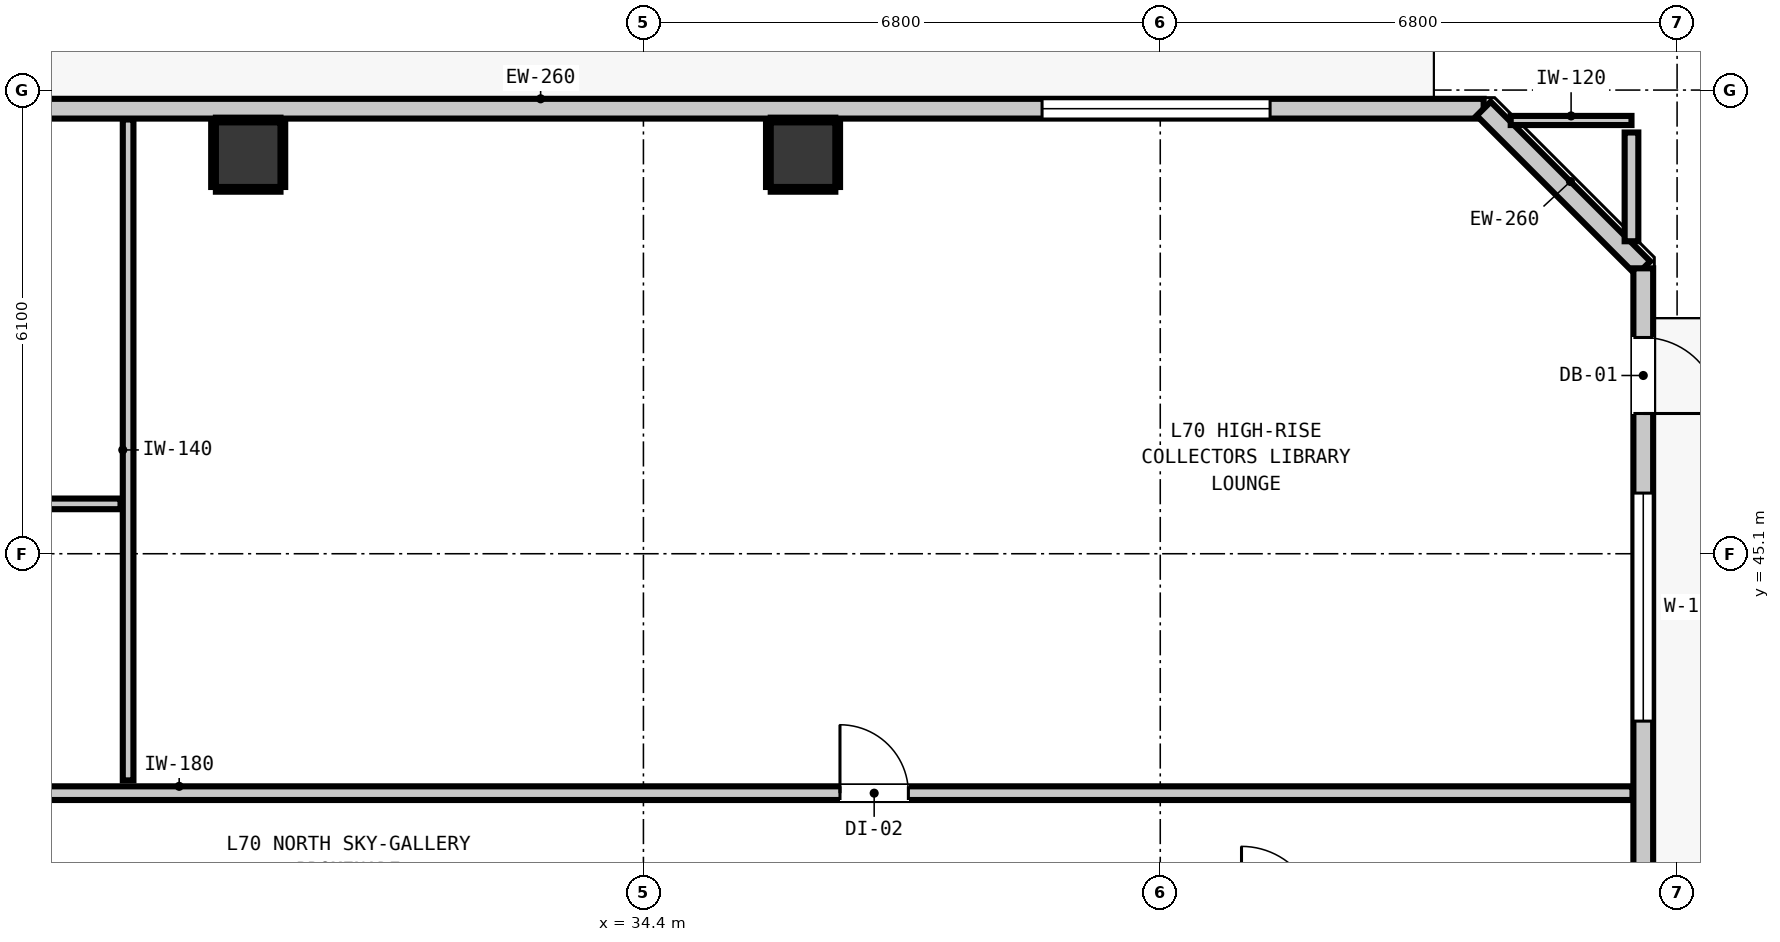
"""IFC4 building model, lengths in metres.
Left out: names, types, materials, properties, quantities, classifications, styles, units other than length and angle.
Written with IfcOpenShell. Run it as: python <this file> out.ifc"""

import sys

from ifc_helpers import new_model, si_unit, direction, frame, frame_2d, origin, origin_2d, place, context, subcontext, project, spatial, rectangle, extrude, element, fill, save


model = new_model("IFC4")
c1 = context("Model", 3, precision=1e-05, world=origin(), true_north=direction((0.0, 1.0)))
c2 = subcontext(c1, "Body", "Model", "MODEL_VIEW")
j1 = project(units=[si_unit("LENGTHUNIT", "METRE"), si_unit("PLANEANGLEUNIT", "RADIAN")], contexts=[c1])
p1 = place(None, origin())
s1 = spatial("IfcSite", under=j1, at=p1, CompositionType="ELEMENT")
p2 = place(p1, origin())
s2 = spatial("IfcBuilding", under=s1, at=p2, CompositionType="ELEMENT")
p3 = place(p2, frame((0.0, 0.0, 241.24)))
s3 = spatial("IfcBuildingStorey", under=s2, at=p3, CompositionType="ELEMENT", Elevation=241.24)
for number, where, z_axis, x_axis in (
    (1, (29.2, 50.35, 0.0), (0.0, 0.0, 1.0), (1.0, 0.0, 0.0)),
    (2, (36.5, 50.35, 0.0), (0.0, 0.0, 1.0), (1.0, 0.0, 0.0)),
):
    element("IfcColumn", number, at=place(p3, frame(where, z_axis=z_axis, x_axis=x_axis)), inside=s3, PredefinedType="COLUMN", context=c2, shape_type="SweptSolid", body=[
        extrude(rectangle(XDim=0.85, YDim=0.85, at=origin_2d()), origin(), (0.0, 0.0, 1.0), 3.32),
    ])
p4 = place(p3, frame((12.745, 50.955, 0.0), z_axis=(0.0, 0.0, 1.0), x_axis=(1.0, 0.0, 0.0)))
e3 = element("IfcWall", 3, at=p4, inside=s3, PredefinedType="STANDARD", context=c2, shape_type="SweptSolid", body=[
    extrude(rectangle(XDim=32.71, YDim=0.26, at=frame_2d((16.355, 0.0))), origin(), (0.0, 0.0, 1.0), 3.1),
])
p5 = place(p4, frame((1.61, 0.0, 0.0)))
e4 = element("IfcOpeningElement", 4, at=p5, cuts=e3, PredefinedType="OPENING", context=c2, shape_type="SweptSolid", body=[
    extrude(rectangle(XDim=1.0, YDim=2.15, at=frame_2d((0.5, 1.075))), frame((0.0, 0.14, 0.0), z_axis=(0.0, -1.0, 0.0), x_axis=(1.0, 0.0, 0.0)), (0.0, 0.0, 1.0), 0.28),
])
p6 = place(p4, frame((3.901, 0.0, 0.85)))
e5 = element("IfcOpeningElement", 5, at=p6, cuts=e3, PredefinedType="OPENING", context=c2, shape_type="SweptSolid", body=[
    extrude(rectangle(XDim=3.0, YDim=2.1, at=frame_2d((1.5, 1.05))), frame((0.0, 0.14, 0.0), z_axis=(0.0, -1.0, 0.0), x_axis=(1.0, 0.0, 0.0)), (0.0, 0.0, 1.0), 0.28),
])
p7 = place(p4, frame((10.705, 0.0, 0.85)))
e6 = element("IfcOpeningElement", 6, at=p7, cuts=e3, PredefinedType="OPENING", context=c2, shape_type="SweptSolid", body=[
    extrude(rectangle(XDim=3.0, YDim=2.1, at=frame_2d((1.5, 1.05))), frame((0.0, 0.14, 0.0), z_axis=(0.0, -1.0, 0.0), x_axis=(1.0, 0.0, 0.0)), (0.0, 0.0, 1.0), 0.28),
])
p8 = place(p4, frame((26.9, 0.0, 0.85)))
e7 = element("IfcOpeningElement", 7, at=p8, cuts=e3, PredefinedType="OPENING", context=c2, shape_type="SweptSolid", body=[
    extrude(rectangle(XDim=3.0, YDim=2.1, at=frame_2d((1.5, 1.05))), frame((0.0, 0.14, 0.0), z_axis=(0.0, -1.0, 0.0), x_axis=(1.0, 0.0, 0.0)), (0.0, 0.0, 1.0), 0.28),
])
p9 = place(p3, frame((45.455, 50.955, 0.0), z_axis=(0.0, 0.0, 1.0), x_axis=(0.707065676302, -0.707147883682, 0.0)))
e8 = element("IfcWall", 8, at=p9, inside=s3, PredefinedType="STANDARD", context=c2, shape_type="SweptSolid", body=[
    extrude(rectangle(XDim=2.97, YDim=0.26, at=frame_2d((1.485, 0.0))), origin(), (0.0, 0.0, 1.0), 3.1),
])
p10 = place(p3, frame((47.555, 48.855, 0.0), z_axis=(0.0, 0.0, 1.0), x_axis=(0.0, -1.0, 0.0)))
e9 = element("IfcWall", 9, at=p10, inside=s3, PredefinedType="STANDARD", context=c2, shape_type="SweptSolid", body=[
    extrude(rectangle(XDim=30.31, YDim=0.26, at=frame_2d((15.155, 0.0))), origin(), (0.0, 0.0, 1.0), 3.1),
])
p11 = place(p10, frame((0.91, 0.0, 0.0)))
e10 = element("IfcOpeningElement", 10, at=p11, cuts=e9, PredefinedType="OPENING", context=c2, shape_type="SweptSolid", body=[
    extrude(rectangle(XDim=1.0, YDim=2.15, at=frame_2d((0.5, 1.075))), frame((0.0, 0.14, 0.0), z_axis=(0.0, -1.0, 0.0), x_axis=(1.0, 0.0, 0.0)), (0.0, 0.0, 1.0), 0.28),
])
p12 = place(p10, frame((2.957, 0.0, 0.85)))
e11 = element("IfcOpeningElement", 11, at=p12, cuts=e9, PredefinedType="OPENING", context=c2, shape_type="SweptSolid", body=[
    extrude(rectangle(XDim=3.0, YDim=2.1, at=frame_2d((1.5, 1.05))), frame((0.0, 0.14, 0.0), z_axis=(0.0, -1.0, 0.0), x_axis=(1.0, 0.0, 0.0)), (0.0, 0.0, 1.0), 0.28),
])
p13 = place(p10, frame((21.005, 0.0, 0.85)))
e12 = element("IfcOpeningElement", 12, at=p13, cuts=e9, PredefinedType="OPENING", context=c2, shape_type="SweptSolid", body=[
    extrude(rectangle(XDim=3.0, YDim=2.1, at=frame_2d((1.5, 1.05))), frame((0.0, 0.14, 0.0), z_axis=(0.0, -1.0, 0.0), x_axis=(1.0, 0.0, 0.0)), (0.0, 0.0, 1.0), 0.28),
])
p14 = place(p3, frame((10.787, 41.95, 0.0), z_axis=(0.0, 0.0, 1.0), x_axis=(1.0, 0.0, 0.0)))
e13 = element("IfcWall", 13, at=p14, inside=s3, PredefinedType="PARTITIONING", context=c2, shape_type="SweptSolid", body=[
    extrude(rectangle(XDim=36.626, YDim=0.18, at=frame_2d((18.313, 0.0))), origin(), (0.0, 0.0, 1.0), 3.1),
])
p15 = place(p14, frame((7.811, 0.0, 0.0)))
e14 = element("IfcOpeningElement", 14, at=p15, cuts=e13, PredefinedType="OPENING", context=c2, shape_type="SweptSolid", body=[
    extrude(rectangle(XDim=1.0, YDim=2.15, at=frame_2d((0.5, 1.075))), frame((0.0, 0.1, 0.0), z_axis=(0.0, -1.0, 0.0), x_axis=(1.0, 0.0, 0.0)), (0.0, 0.0, 1.0), 0.2),
])
p16 = place(p14, frame((26.199, 0.0, 0.0)))
e15 = element("IfcOpeningElement", 15, at=p16, cuts=e13, PredefinedType="OPENING", context=c2, shape_type="SweptSolid", body=[
    extrude(rectangle(XDim=0.9, YDim=2.1, at=frame_2d((0.45, 1.05))), frame((0.0, 0.1, 0.0), z_axis=(0.0, -1.0, 0.0), x_axis=(1.0, 0.0, 0.0)), (0.0, 0.0, 1.0), 0.2),
])
p17 = place(p3, frame((22.38, 45.756, 0.0), z_axis=(0.0, 0.0, 1.0), x_axis=(1.0, 0.0, 0.0)))
e16 = element("IfcWall", 16, at=p17, inside=s3, PredefinedType="PARTITIONING", context=c2, shape_type="SweptSolid", body=[
    extrude(rectangle(XDim=5.14, YDim=0.14, at=frame_2d((2.57, 0.0))), origin(), (0.0, 0.0, 1.0), 3.1),
])
p18 = place(p3, frame((45.811, 50.8, 0.0), z_axis=(0.0, 0.0, 1.0), x_axis=(1.0, 0.0, 0.0)))
e17 = element("IfcWall", 17, at=p18, inside=s3, PredefinedType="PARTITIONING", context=c2, shape_type="SweptSolid", body=[
    extrude(rectangle(XDim=1.589, YDim=0.12, at=frame_2d((0.794, 0.0))), origin(), (0.0, 0.0, 1.0), 3.1),
])
p19 = place(p3, frame((47.4, 49.211, 0.0), z_axis=(0.0, 0.0, 1.0), x_axis=(0.0, 1.0, 0.0)))
e18 = element("IfcWall", 18, at=p19, inside=s3, PredefinedType="PARTITIONING", context=c2, shape_type="SweptSolid", body=[
    extrude(rectangle(XDim=1.431, YDim=0.18, at=frame_2d((0.716, 0.0))), origin(), (0.0, 0.0, 1.0), 3.1),
])
p20 = place(p3, frame((27.62, 42.118, 0.0), z_axis=(0.0, 0.0, 1.0), x_axis=(0.0, 1.0, 0.0)))
e19 = element("IfcWall", 19, at=p20, inside=s3, PredefinedType="PARTITIONING", context=c2, shape_type="SweptSolid", body=[
    extrude(rectangle(XDim=8.695, YDim=0.14, at=frame_2d((4.348, 0.0))), origin(), (0.0, 0.0, 1.0), 3.1),
])
for number, where, z_axis, x_axis in (
    (20, (28.775, 49.893, 0.0), (0.0, 0.0, 1.0), (1.0, 0.0, 0.0)),
    (21, (28.775, 50.807, 0.0), (0.0, 0.0, 1.0), (1.0, 0.0, 0.0)),
):
    element("IfcWall", number, at=place(p3, frame(where, z_axis=z_axis, x_axis=x_axis)), inside=s3, PredefinedType="PARTITIONING", context=c2, shape_type="SweptSolid", body=[
        extrude(rectangle(XDim=0.85, YDim=0.06, at=frame_2d((0.425, 0.0))), origin(), (0.0, 0.0, 1.0), 1.45),
    ])
for number, where, z_axis, x_axis in (
    (22, (28.743, 49.925, 0.0), (0.0, 0.0, 1.0), (0.0, 1.0, 0.0)),
    (23, (29.657, 49.925, 0.0), (0.0, 0.0, 1.0), (0.0, 1.0, 0.0)),
):
    element("IfcWall", number, at=place(p3, frame(where, z_axis=z_axis, x_axis=x_axis)), inside=s3, PredefinedType="PARTITIONING", context=c2, shape_type="SweptSolid", body=[
        extrude(rectangle(XDim=0.85, YDim=0.06, at=frame_2d((0.425, 0.0))), origin(), (0.0, 0.0, 1.0), 1.45),
    ])
for number, where, z_axis, x_axis in (
    (24, (36.075, 49.893, 0.0), (0.0, 0.0, 1.0), (1.0, 0.0, 0.0)),
    (25, (36.075, 50.807, 0.0), (0.0, 0.0, 1.0), (1.0, 0.0, 0.0)),
):
    element("IfcWall", number, at=place(p3, frame(where, z_axis=z_axis, x_axis=x_axis)), inside=s3, PredefinedType="PARTITIONING", context=c2, shape_type="SweptSolid", body=[
        extrude(rectangle(XDim=0.85, YDim=0.06, at=frame_2d((0.425, 0.0))), origin(), (0.0, 0.0, 1.0), 1.45),
    ])
for number, where, z_axis, x_axis in (
    (26, (36.043, 49.925, 0.0), (0.0, 0.0, 1.0), (0.0, 1.0, 0.0)),
    (27, (36.957, 49.925, 0.0), (0.0, 0.0, 1.0), (0.0, 1.0, 0.0)),
):
    element("IfcWall", number, at=place(p3, frame(where, z_axis=z_axis, x_axis=x_axis)), inside=s3, PredefinedType="PARTITIONING", context=c2, shape_type="SweptSolid", body=[
        extrude(rectangle(XDim=0.85, YDim=0.06, at=frame_2d((0.425, 0.0))), origin(), (0.0, 0.0, 1.0), 1.45),
    ])
p21 = place(p11, origin())
e28 = element("IfcDoor", 28, at=p21, inside=s3, OperationType="SINGLE_SWING_RIGHT", PredefinedType="DOOR", context=c2, shape_type="SweptSolid", body=[
    extrude(rectangle(XDim=1.0, YDim=2.15, at=frame_2d((0.5, 1.075))), frame((0.0, 0.025, 0.0), z_axis=(0.0, -1.0, 0.0), x_axis=(1.0, 0.0, 0.0)), (0.0, 0.0, 1.0), 0.05),
])
fill(e10, e28)
p22 = place(p8, origin())
e29 = element("IfcWindow", 29, at=p22, inside=s3, PartitioningType="SINGLE_PANEL", PredefinedType="WINDOW", context=c2, shape_type="SweptSolid", body=[
    extrude(rectangle(XDim=3.0, YDim=2.1, at=frame_2d((1.5, 1.05))), frame((0.0, 0.03, 0.0), z_axis=(0.0, -1.0, 0.0), x_axis=(1.0, 0.0, 0.0)), (0.0, 0.0, 1.0), 0.06),
])
fill(e7, e29)
p23 = place(p12, origin())
e30 = element("IfcWindow", 30, at=p23, inside=s3, PartitioningType="SINGLE_PANEL", PredefinedType="WINDOW", context=c2, shape_type="SweptSolid", body=[
    extrude(rectangle(XDim=3.0, YDim=2.1, at=frame_2d((1.5, 1.05))), frame((0.0, 0.03, 0.0), z_axis=(0.0, -1.0, 0.0), x_axis=(1.0, 0.0, 0.0)), (0.0, 0.0, 1.0), 0.06),
])
fill(e11, e30)
p24 = place(p16, origin())
e31 = element("IfcDoor", 31, at=p24, inside=s3, OperationType="SINGLE_SWING_LEFT", PredefinedType="DOOR", context=c2, shape_type="SweptSolid", body=[
    extrude(rectangle(XDim=0.9, YDim=2.1, at=frame_2d((0.45, 1.05))), frame((0.0, 0.025, 0.0), z_axis=(0.0, -1.0, 0.0), x_axis=(1.0, 0.0, 0.0)), (0.0, 0.0, 1.0), 0.05),
])
fill(e15, e31)
save(model, sys.argv[1])
